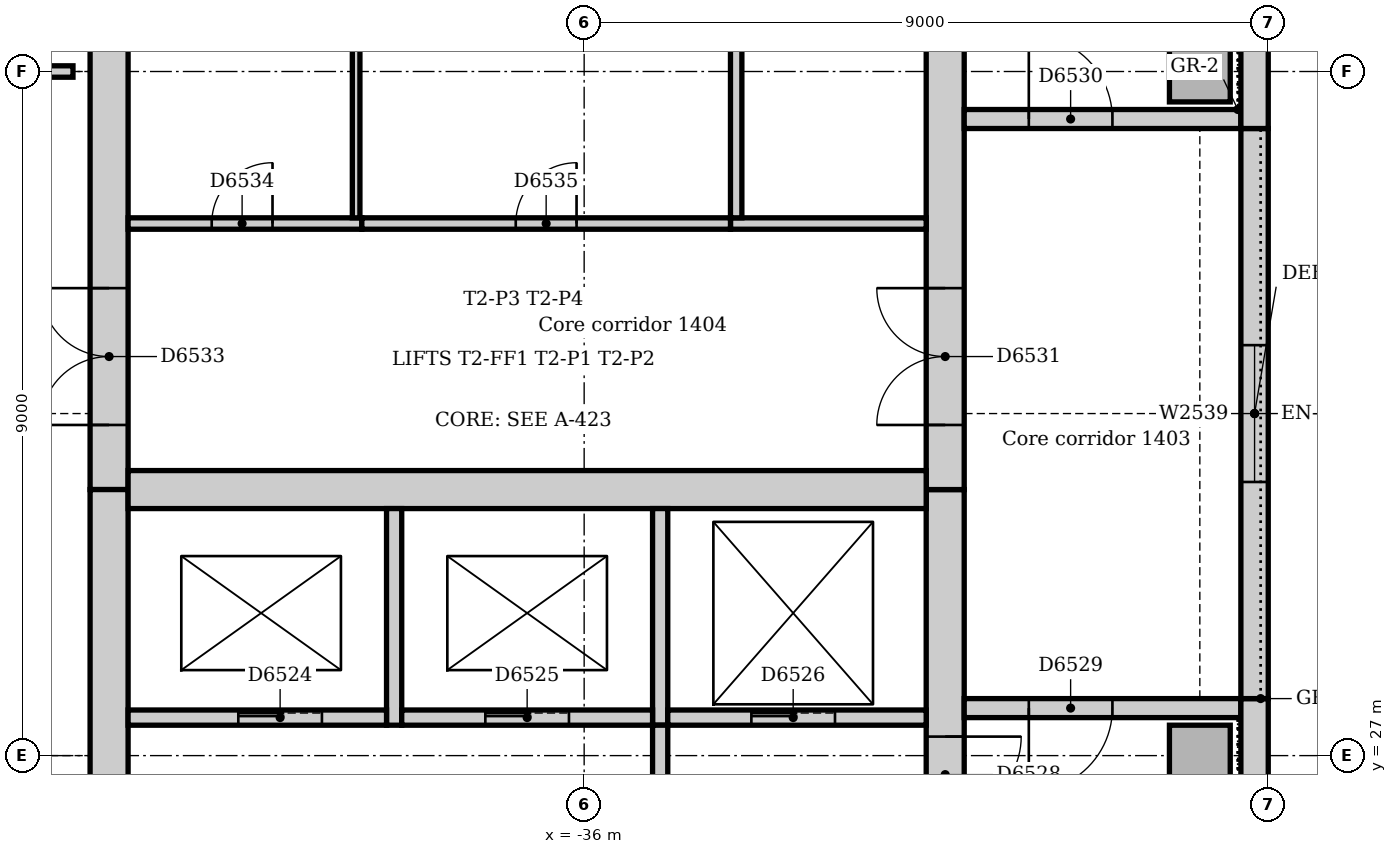
"""IFC4 building model, lengths in metres.
Left out: names, types, materials, properties, quantities, classifications, styles, units other than length and angle.
Written with IfcOpenShell. Run it as: python <this file> out.ifc"""

import sys

from ifc_helpers import new_model, si_unit, direction, frame, frame_2d, origin, origin_2d, place, context, subcontext, project, spatial, rectangle, extrude, element, fill, save


model = new_model("IFC4")
c1 = context("Model", 3, precision=1e-05, world=origin(), true_north=direction((0.0, 1.0)))
c2 = subcontext(c1, "Body", "Model", "MODEL_VIEW")
j1 = project(units=[si_unit("LENGTHUNIT", "METRE"), si_unit("PLANEANGLEUNIT", "RADIAN")], contexts=[c1])
p1 = place(None, origin())
s1 = spatial("IfcSite", under=j1, at=p1, CompositionType="ELEMENT")
p2 = place(p1, origin())
s2 = spatial("IfcBuilding", under=s1, at=p2, CompositionType="ELEMENT")
p3 = place(p2, frame((0.0, 0.0, 63.0)))
s3 = spatial("IfcBuildingStorey", under=s2, at=p3, CompositionType="ELEMENT", Elevation=63.0)
p4 = place(p3, frame((-31.25, 21.0, 0.0), z_axis=(0.0, 0.0, 1.0), x_axis=(0.0, 1.0, 0.0)))
e1 = element("IfcWall", 1, at=p4, inside=s3, PredefinedType="SOLIDWALL", context=c2, shape_type="SweptSolid", body=[
    extrude(rectangle(XDim=9.5, YDim=0.5, at=frame_2d((4.75, 0.0))), origin(), (0.0, 0.0, 1.0), 4.0),
])
p5 = place(p4, frame((5.25, 0.0, 0.0)))
e2 = element("IfcOpeningElement", 2, at=p5, cuts=e1, PredefinedType="OPENING", context=c2, shape_type="SweptSolid", body=[
    extrude(rectangle(XDim=1.0, YDim=2.1, at=frame_2d((0.5, 1.05))), frame((0.0, 0.26, 0.0), z_axis=(0.0, -1.0, 0.0), x_axis=(1.0, 0.0, 0.0)), (0.0, 0.0, 1.0), 0.52),
])
p6 = place(p3, frame((-31.25, 30.5, 0.0), z_axis=(0.0, 0.0, 1.0), x_axis=(0.0, 1.0, 0.0)))
e3 = element("IfcWall", 3, at=p6, inside=s3, PredefinedType="SOLIDWALL", context=c2, shape_type="SweptSolid", body=[
    extrude(rectangle(XDim=11.5, YDim=0.5, at=frame_2d((5.75, 0.0))), origin(), (0.0, 0.0, 1.0), 4.0),
])
p7 = place(p6, frame((0.85, 0.0, 0.0)))
e4 = element("IfcOpeningElement", 4, at=p7, cuts=e3, PredefinedType="OPENING", context=c2, shape_type="SweptSolid", body=[
    extrude(rectangle(XDim=1.8, YDim=2.1, at=frame_2d((0.9, 1.05))), frame((0.0, 0.26, 0.0), z_axis=(0.0, -1.0, 0.0), x_axis=(1.0, 0.0, 0.0)), (0.0, 0.0, 1.0), 0.52),
])
p8 = place(p3, frame((-42.25, 42.0, 0.0), z_axis=(0.0, 0.0, 1.0), x_axis=(0.0, -1.0, 0.0)))
e5 = element("IfcWall", 5, at=p8, inside=s3, PredefinedType="SOLIDWALL", context=c2, shape_type="SweptSolid", body=[
    extrude(rectangle(XDim=11.5, YDim=0.5, at=frame_2d((5.75, 0.0))), origin(), (0.0, 0.0, 1.0), 4.0),
])
p9 = place(p8, frame((8.85, 0.0, 0.0)))
e6 = element("IfcOpeningElement", 6, at=p9, cuts=e5, PredefinedType="OPENING", context=c2, shape_type="SweptSolid", body=[
    extrude(rectangle(XDim=1.8, YDim=2.1, at=frame_2d((0.9, 1.05))), frame((0.0, 0.26, 0.0), z_axis=(0.0, -1.0, 0.0), x_axis=(1.0, 0.0, 0.0)), (0.0, 0.0, 1.0), 0.52),
])
p10 = place(p3, frame((-42.25, 30.5, 0.0), z_axis=(0.0, 0.0, 1.0), x_axis=(0.0, -1.0, 0.0)))
e7 = element("IfcWall", 7, at=p10, inside=s3, PredefinedType="SOLIDWALL", context=c2, shape_type="SweptSolid", body=[
    extrude(rectangle(XDim=9.5, YDim=0.5, at=frame_2d((4.75, 0.0))), origin(), (0.0, 0.0, 1.0), 4.0),
])
p11 = place(p10, frame((3.85, 0.0, 0.0)))
e8 = element("IfcOpeningElement", 8, at=p11, cuts=e7, PredefinedType="OPENING", context=c2, shape_type="SweptSolid", body=[
    extrude(rectangle(XDim=1.8, YDim=2.1, at=frame_2d((0.9, 1.05))), frame((0.0, 0.26, 0.0), z_axis=(0.0, -1.0, 0.0), x_axis=(1.0, 0.0, 0.0)), (0.0, 0.0, 1.0), 0.52),
])
p12 = place(p3, frame((-42.0, 30.5, 0.0), z_axis=(0.0, 0.0, 1.0), x_axis=(1.0, 0.0, 0.0)))
e9 = element("IfcWall", 9, at=p12, inside=s3, PredefinedType="SOLIDWALL", context=c2, shape_type="SweptSolid", body=[
    extrude(rectangle(XDim=10.5, YDim=0.5, at=frame_2d((5.25, 0.0))), origin(), (0.0, 0.0, 1.0), 4.0),
])
p13 = place(p3, frame((-27.36, 27.625, 0.0), z_axis=(0.0, 0.0, 1.0), x_axis=(-1.0, 0.0, 0.0)))
e10 = element("IfcWall", 10, at=p13, inside=s3, PredefinedType="SOLIDWALL", context=c2, shape_type="SweptSolid", body=[
    extrude(rectangle(XDim=3.64, YDim=0.25, at=frame_2d((1.82, 0.0))), origin(), (0.0, 0.0, 1.0), 4.0),
])
p14 = place(p13, frame((1.69, 0.0, 0.0)))
e11 = element("IfcOpeningElement", 11, at=p14, cuts=e10, PredefinedType="OPENING", context=c2, shape_type="SweptSolid", body=[
    extrude(rectangle(XDim=1.1, YDim=2.1, at=frame_2d((0.55, 1.05))), frame((0.0, 0.135, 0.0), z_axis=(0.0, -1.0, 0.0), x_axis=(1.0, 0.0, 0.0)), (0.0, 0.0, 1.0), 0.27),
])
p15 = place(p3, frame((-31.0, 35.375, 0.0), z_axis=(0.0, 0.0, 1.0), x_axis=(1.0, 0.0, 0.0)))
e12 = element("IfcWall", 12, at=p15, inside=s3, PredefinedType="SOLIDWALL", context=c2, shape_type="SweptSolid", body=[
    extrude(rectangle(XDim=3.64, YDim=0.25, at=frame_2d((1.82, 0.0))), origin(), (0.0, 0.0, 1.0), 4.0),
])
p16 = place(p15, frame((0.85, 0.0, 0.0)))
e13 = element("IfcOpeningElement", 13, at=p16, cuts=e12, PredefinedType="OPENING", context=c2, shape_type="SweptSolid", body=[
    extrude(rectangle(XDim=1.1, YDim=2.1, at=frame_2d((0.55, 1.05))), frame((0.0, 0.135, 0.0), z_axis=(0.0, -1.0, 0.0), x_axis=(1.0, 0.0, 0.0)), (0.0, 0.0, 1.0), 0.27),
])
for number, where, z_axis, x_axis in (
    (14, (-27.9, 27.0, 0.0), (0.0, 0.0, 1.0), (1.0, 0.0, 0.0)),
    (15, (-27.9, 36.0, 0.0), (0.0, 0.0, 1.0), (1.0, 0.0, 0.0)),
):
    element("IfcColumn", number, at=place(p3, frame(where, z_axis=z_axis, x_axis=x_axis)), inside=s3, PredefinedType="COLUMN", context=c2, shape_type="SweptSolid", body=[
        extrude(rectangle(XDim=0.8, YDim=0.8, at=origin_2d()), origin(), (0.0, 0.0, 1.0), 4.0),
    ])
p17 = place(p3, frame((-27.18, 21.0, 0.0), z_axis=(0.0, 0.0, 1.0), x_axis=(0.0, 1.0, 0.0)))
e16 = element("IfcWall", 16, at=p17, inside=s3, PredefinedType="STANDARD", context=c2, shape_type="SweptSolid", body=[
    extrude(rectangle(XDim=6.75, YDim=0.36, at=frame_2d((3.375, 0.0))), origin(), (0.0, 0.0, 1.0), 3.85),
])
p18 = place(p3, frame((-27.18, 27.75, 0.0), z_axis=(0.0, 0.0, 1.0), x_axis=(0.0, 1.0, 0.0)))
e17 = element("IfcWall", 17, at=p18, inside=s3, PredefinedType="STANDARD", context=c2, shape_type="SweptSolid", body=[
    extrude(rectangle(XDim=7.5, YDim=0.36, at=frame_2d((3.75, 0.0))), origin(), (0.0, 0.0, 1.0), 3.85),
])
p19 = place(p18, frame((2.85, 0.0, 1.2)))
e18 = element("IfcOpeningElement", 18, at=p19, cuts=e17, PredefinedType="OPENING", context=c2, shape_type="SweptSolid", body=[
    extrude(rectangle(XDim=1.8, YDim=1.2, at=frame_2d((0.9, 0.6))), frame((0.0, 0.19, 0.0), z_axis=(0.0, -1.0, 0.0), x_axis=(1.0, 0.0, 0.0)), (0.0, 0.0, 1.0), 0.38),
])
p20 = place(p3, frame((-27.18, 35.25, 0.0), z_axis=(0.0, 0.0, 1.0), x_axis=(0.0, 1.0, 0.0)))
e19 = element("IfcWall", 19, at=p20, inside=s3, PredefinedType="STANDARD", context=c2, shape_type="SweptSolid", body=[
    extrude(rectangle(XDim=6.75, YDim=0.36, at=frame_2d((3.375, 0.0))), origin(), (0.0, 0.0, 1.0), 3.85),
])
p21 = place(p3, frame((-38.5, 27.4, 0.0), z_axis=(0.0, 0.0, 1.0), x_axis=(0.0, 1.0, 0.0)))
e20 = element("IfcWall", 20, at=p21, inside=s3, PredefinedType="SOLIDWALL", context=c2, shape_type="SweptSolid", body=[
    extrude(rectangle(XDim=2.85, YDim=0.2, at=frame_2d((1.425, 0.0))), origin(), (0.0, 0.0, 1.0), 4.0),
])
p22 = place(p3, frame((-42.0, 27.5, 0.0), z_axis=(0.0, 0.0, 1.0), x_axis=(1.0, 0.0, 0.0)))
e21 = element("IfcWall", 21, at=p22, inside=s3, PredefinedType="SOLIDWALL", context=c2, shape_type="SweptSolid", body=[
    extrude(rectangle(XDim=3.4, YDim=0.2, at=frame_2d((1.7, 0.0))), origin(), (0.0, 0.0, 1.0), 4.0),
])
p23 = place(p22, frame((1.45, 0.0, 0.0)))
e22 = element("IfcOpeningElement", 22, at=p23, cuts=e21, PredefinedType="OPENING", context=c2, shape_type="SweptSolid", body=[
    extrude(rectangle(XDim=1.1, YDim=2.1, at=frame_2d((0.55, 1.05))), frame((0.0, 0.11, 0.0), z_axis=(0.0, -1.0, 0.0), x_axis=(1.0, 0.0, 0.0)), (0.0, 0.0, 1.0), 0.22),
])
p24 = place(p3, frame((-35.0, 27.4, 0.0), z_axis=(0.0, 0.0, 1.0), x_axis=(0.0, 1.0, 0.0)))
e23 = element("IfcWall", 23, at=p24, inside=s3, PredefinedType="SOLIDWALL", context=c2, shape_type="SweptSolid", body=[
    extrude(rectangle(XDim=2.85, YDim=0.2, at=frame_2d((1.425, 0.0))), origin(), (0.0, 0.0, 1.0), 4.0),
])
p25 = place(p3, frame((-38.4, 27.5, 0.0), z_axis=(0.0, 0.0, 1.0), x_axis=(1.0, 0.0, 0.0)))
e24 = element("IfcWall", 24, at=p25, inside=s3, PredefinedType="SOLIDWALL", context=c2, shape_type="SweptSolid", body=[
    extrude(rectangle(XDim=3.3, YDim=0.2, at=frame_2d((1.65, 0.0))), origin(), (0.0, 0.0, 1.0), 4.0),
])
p26 = place(p25, frame((1.1, 0.0, 0.0)))
e25 = element("IfcOpeningElement", 25, at=p26, cuts=e24, PredefinedType="OPENING", context=c2, shape_type="SweptSolid", body=[
    extrude(rectangle(XDim=1.1, YDim=2.1, at=frame_2d((0.55, 1.05))), frame((0.0, 0.11, 0.0), z_axis=(0.0, -1.0, 0.0), x_axis=(1.0, 0.0, 0.0)), (0.0, 0.0, 1.0), 0.22),
])
p27 = place(p3, frame((-34.9, 27.5, 0.0), z_axis=(0.0, 0.0, 1.0), x_axis=(1.0, 0.0, 0.0)))
e26 = element("IfcWall", 26, at=p27, inside=s3, PredefinedType="SOLIDWALL", context=c2, shape_type="SweptSolid", body=[
    extrude(rectangle(XDim=3.4, YDim=0.2, at=frame_2d((1.7, 0.0))), origin(), (0.0, 0.0, 1.0), 4.0),
])
p28 = place(p27, frame((1.1, 0.0, 0.0)))
e27 = element("IfcOpeningElement", 27, at=p28, cuts=e26, PredefinedType="OPENING", context=c2, shape_type="SweptSolid", body=[
    extrude(rectangle(XDim=1.1, YDim=2.1, at=frame_2d((0.55, 1.05))), frame((0.0, 0.11, 0.0), z_axis=(0.0, -1.0, 0.0), x_axis=(1.0, 0.0, 0.0)), (0.0, 0.0, 1.0), 0.22),
])
p29 = place(p3, frame((-35.0, 24.1, 0.0), z_axis=(0.0, 0.0, 1.0), x_axis=(0.0, 1.0, 0.0)))
e28 = element("IfcWall", 28, at=p29, inside=s3, PredefinedType="SOLIDWALL", context=c2, shape_type="SweptSolid", body=[
    extrude(rectangle(XDim=3.3, YDim=0.2, at=frame_2d((1.65, 0.0))), origin(), (0.0, 0.0, 1.0), 4.0),
])
p30 = place(p29, frame((1.15, 0.0, 0.0)))
e29 = element("IfcOpeningElement", 29, at=p30, cuts=e28, PredefinedType="OPENING", context=c2, shape_type="SweptSolid", body=[
    extrude(rectangle(XDim=1.0, YDim=2.1, at=frame_2d((0.5, 1.05))), frame((0.0, 0.11, 0.0), z_axis=(0.0, -1.0, 0.0), x_axis=(1.0, 0.0, 0.0)), (0.0, 0.0, 1.0), 0.22),
])
p31 = place(p3, frame((-34.075, 34.0, 0.0), z_axis=(0.0, 0.0, 1.0), x_axis=(1.0, 0.0, 0.0)))
e30 = element("IfcWall", 30, at=p31, inside=s3, PredefinedType="SOLIDWALL", context=c2, shape_type="SweptSolid", body=[
    extrude(rectangle(XDim=2.575, YDim=0.15, at=frame_2d((1.288, 0.0))), origin(), (0.0, 0.0, 1.0), 4.0),
])
p32 = place(p3, frame((-34.0, 41.075, 0.0), z_axis=(0.0, 0.0, 1.0), x_axis=(0.0, -1.0, 0.0)))
e31 = element("IfcWall", 31, at=p32, inside=s3, PredefinedType="SOLIDWALL", context=c2, shape_type="SweptSolid", body=[
    extrude(rectangle(XDim=7.0, YDim=0.15, at=frame_2d((3.5, 0.0))), origin(), (0.0, 0.0, 1.0), 4.0),
])
p33 = place(p3, frame((-38.925, 34.0, 0.0), z_axis=(0.0, 0.0, 1.0), x_axis=(-1.0, 0.0, 0.0)))
e32 = element("IfcWall", 32, at=p33, inside=s3, PredefinedType="PARTITIONING", context=c2, shape_type="SweptSolid", body=[
    extrude(rectangle(XDim=3.075, YDim=0.15, at=frame_2d((1.538, 0.0))), origin(), (0.0, 0.0, 1.0), 3.85),
])
p34 = place(p33, frame((1.175, 0.0, 0.0)))
e33 = element("IfcOpeningElement", 33, at=p34, cuts=e32, PredefinedType="OPENING", context=c2, shape_type="SweptSolid", body=[
    extrude(rectangle(XDim=0.8, YDim=2.1, at=frame_2d((0.4, 1.05))), frame((0.0, 0.085, 0.0), z_axis=(0.0, -1.0, 0.0), x_axis=(1.0, 0.0, 0.0)), (0.0, 0.0, 1.0), 0.17),
])
p35 = place(p3, frame((-34.075, 34.0, 0.0), z_axis=(0.0, 0.0, 1.0), x_axis=(-1.0, 0.0, 0.0)))
e34 = element("IfcWall", 34, at=p35, inside=s3, PredefinedType="PARTITIONING", context=c2, shape_type="SweptSolid", body=[
    extrude(rectangle(XDim=4.85, YDim=0.15, at=frame_2d((2.425, 0.0))), origin(), (0.0, 0.0, 1.0), 3.85),
])
p36 = place(p35, frame((2.025, 0.0, 0.0)))
e35 = element("IfcOpeningElement", 35, at=p36, cuts=e34, PredefinedType="OPENING", context=c2, shape_type="SweptSolid", body=[
    extrude(rectangle(XDim=0.8, YDim=2.1, at=frame_2d((0.4, 1.05))), frame((0.0, 0.085, 0.0), z_axis=(0.0, -1.0, 0.0), x_axis=(1.0, 0.0, 0.0)), (0.0, 0.0, 1.0), 0.17),
])
p37 = place(p3, frame((-39.0, 34.075, 0.0), z_axis=(0.0, 0.0, 1.0), x_axis=(0.0, 1.0, 0.0)))
e36 = element("IfcWall", 36, at=p37, inside=s3, PredefinedType="PARTITIONING", context=c2, shape_type="SweptSolid", body=[
    extrude(rectangle(XDim=7.925, YDim=0.1, at=frame_2d((3.962, 0.0))), origin(), (0.0, 0.0, 1.0), 3.85),
])
p38 = place(p3, frame((-44.65, 36.0, 0.0), z_axis=(0.0, 0.0, 1.0), x_axis=(1.0, 0.0, 0.0)))
e37 = element("IfcWall", 37, at=p38, inside=s3, PredefinedType="PARTITIONING", context=c2, shape_type="SweptSolid", body=[
    extrude(rectangle(XDim=1.925, YDim=0.15, at=frame_2d((0.963, 0.0))), origin(), (0.0, 0.0, 1.0), 3.602),
])
p39 = place(p38, frame((0.5, 0.0, 0.0)))
e38 = element("IfcOpeningElement", 38, at=p39, cuts=e37, PredefinedType="OPENING", context=c2, shape_type="SweptSolid", body=[
    extrude(rectangle(XDim=0.9, YDim=2.1, at=frame_2d((0.45, 1.05))), frame((0.0, 0.085, 0.0), z_axis=(0.0, -1.0, 0.0), x_axis=(1.0, 0.0, 0.0)), (0.0, 0.0, 1.0), 0.17),
])
p40 = place(p19, origin())
e39 = element("IfcWindow", 39, at=p40, inside=s3, PartitioningType="SINGLE_PANEL", PredefinedType="WINDOW", context=c2, shape_type="SweptSolid", body=[
    extrude(rectangle(XDim=1.8, YDim=1.2, at=frame_2d((0.9, 0.6))), frame((0.0, 0.13, 0.0), z_axis=(0.0, -1.0, 0.0), x_axis=(1.0, 0.0, 0.0)), (0.0, 0.0, 1.0), 0.06),
])
fill(e18, e39)
p41 = place(p23, origin())
e40 = element("IfcDoor", 40, at=p41, inside=s3, OperationType="SLIDING_TO_LEFT", PredefinedType="DOOR", context=c2, shape_type="SweptSolid", body=[
    extrude(rectangle(XDim=1.1, YDim=2.1, at=frame_2d((0.55, 1.05))), frame((0.0, 0.025, 0.0), z_axis=(0.0, -1.0, 0.0), x_axis=(1.0, 0.0, 0.0)), (0.0, 0.0, 1.0), 0.05),
])
fill(e22, e40)
p42 = place(p26, origin())
e41 = element("IfcDoor", 41, at=p42, inside=s3, OperationType="SLIDING_TO_LEFT", PredefinedType="DOOR", context=c2, shape_type="SweptSolid", body=[
    extrude(rectangle(XDim=1.1, YDim=2.1, at=frame_2d((0.55, 1.05))), frame((0.0, 0.025, 0.0), z_axis=(0.0, -1.0, 0.0), x_axis=(1.0, 0.0, 0.0)), (0.0, 0.0, 1.0), 0.05),
])
fill(e25, e41)
p43 = place(p28, origin())
e42 = element("IfcDoor", 42, at=p43, inside=s3, OperationType="SLIDING_TO_LEFT", PredefinedType="DOOR", context=c2, shape_type="SweptSolid", body=[
    extrude(rectangle(XDim=1.1, YDim=2.1, at=frame_2d((0.55, 1.05))), frame((0.0, 0.025, 0.0), z_axis=(0.0, -1.0, 0.0), x_axis=(1.0, 0.0, 0.0)), (0.0, 0.0, 1.0), 0.05),
])
fill(e27, e42)
p44 = place(p5, frame((1.0, 0.0, 0.0), z_axis=(0.0, 0.0, 1.0), x_axis=(-1.0, 0.0, 0.0)))
e43 = element("IfcDoor", 43, at=p44, inside=s3, OperationType="SINGLE_SWING_LEFT", PredefinedType="DOOR", context=c2, shape_type="SweptSolid", body=[
    extrude(rectangle(XDim=1.0, YDim=2.1, at=frame_2d((0.5, 1.05))), frame((0.0, 0.025, 0.0), z_axis=(0.0, -1.0, 0.0), x_axis=(1.0, 0.0, 0.0)), (0.0, 0.0, 1.0), 0.05),
])
fill(e2, e43)
p45 = place(p14, origin())
e44 = element("IfcDoor", 44, at=p45, inside=s3, OperationType="SINGLE_SWING_RIGHT", PredefinedType="DOOR", context=c2, shape_type="SweptSolid", body=[
    extrude(rectangle(XDim=1.1, YDim=2.1, at=frame_2d((0.55, 1.05))), frame((0.0, 0.025, 0.0), z_axis=(0.0, -1.0, 0.0), x_axis=(1.0, 0.0, 0.0)), (0.0, 0.0, 1.0), 0.05),
])
fill(e11, e44)
p46 = place(p16, origin())
e45 = element("IfcDoor", 45, at=p46, inside=s3, OperationType="SINGLE_SWING_LEFT", PredefinedType="DOOR", context=c2, shape_type="SweptSolid", body=[
    extrude(rectangle(XDim=1.1, YDim=2.1, at=frame_2d((0.55, 1.05))), frame((0.0, 0.025, 0.0), z_axis=(0.0, -1.0, 0.0), x_axis=(1.0, 0.0, 0.0)), (0.0, 0.0, 1.0), 0.05),
])
fill(e13, e45)
p47 = place(p7, origin())
e46 = element("IfcDoor", 46, at=p47, inside=s3, OperationType="DOUBLE_DOOR_SINGLE_SWING", PredefinedType="DOOR", context=c2, shape_type="SweptSolid", body=[
    extrude(rectangle(XDim=1.8, YDim=2.1, at=frame_2d((0.9, 1.05))), frame((0.0, 0.025, 0.0), z_axis=(0.0, -1.0, 0.0), x_axis=(1.0, 0.0, 0.0)), (0.0, 0.0, 1.0), 0.05),
])
fill(e4, e46)
p48 = place(p9, frame((1.8, 0.0, 0.0), z_axis=(0.0, 0.0, 1.0), x_axis=(-1.0, 0.0, 0.0)))
e47 = element("IfcDoor", 47, at=p48, inside=s3, OperationType="DOUBLE_DOOR_SINGLE_SWING", PredefinedType="DOOR", context=c2, shape_type="SweptSolid", body=[
    extrude(rectangle(XDim=1.8, YDim=2.1, at=frame_2d((0.9, 1.05))), frame((0.0, 0.025, 0.0), z_axis=(0.0, -1.0, 0.0), x_axis=(1.0, 0.0, 0.0)), (0.0, 0.0, 1.0), 0.05),
])
fill(e6, e47)
p49 = place(p34, frame((0.8, 0.0, 0.0), z_axis=(0.0, 0.0, 1.0), x_axis=(-1.0, 0.0, 0.0)))
e48 = element("IfcDoor", 48, at=p49, inside=s3, OperationType="SINGLE_SWING_RIGHT", PredefinedType="DOOR", context=c2, shape_type="SweptSolid", body=[
    extrude(rectangle(XDim=0.8, YDim=2.1, at=frame_2d((0.4, 1.05))), frame((0.0, 0.025, 0.0), z_axis=(0.0, -1.0, 0.0), x_axis=(1.0, 0.0, 0.0)), (0.0, 0.0, 1.0), 0.05),
])
fill(e33, e48)
p50 = place(p36, frame((0.8, 0.0, 0.0), z_axis=(0.0, 0.0, 1.0), x_axis=(-1.0, 0.0, 0.0)))
e49 = element("IfcDoor", 49, at=p50, inside=s3, OperationType="SINGLE_SWING_RIGHT", PredefinedType="DOOR", context=c2, shape_type="SweptSolid", body=[
    extrude(rectangle(XDim=0.8, YDim=2.1, at=frame_2d((0.4, 1.05))), frame((0.0, 0.025, 0.0), z_axis=(0.0, -1.0, 0.0), x_axis=(1.0, 0.0, 0.0)), (0.0, 0.0, 1.0), 0.05),
])
fill(e35, e49)
save(model, sys.argv[1])
